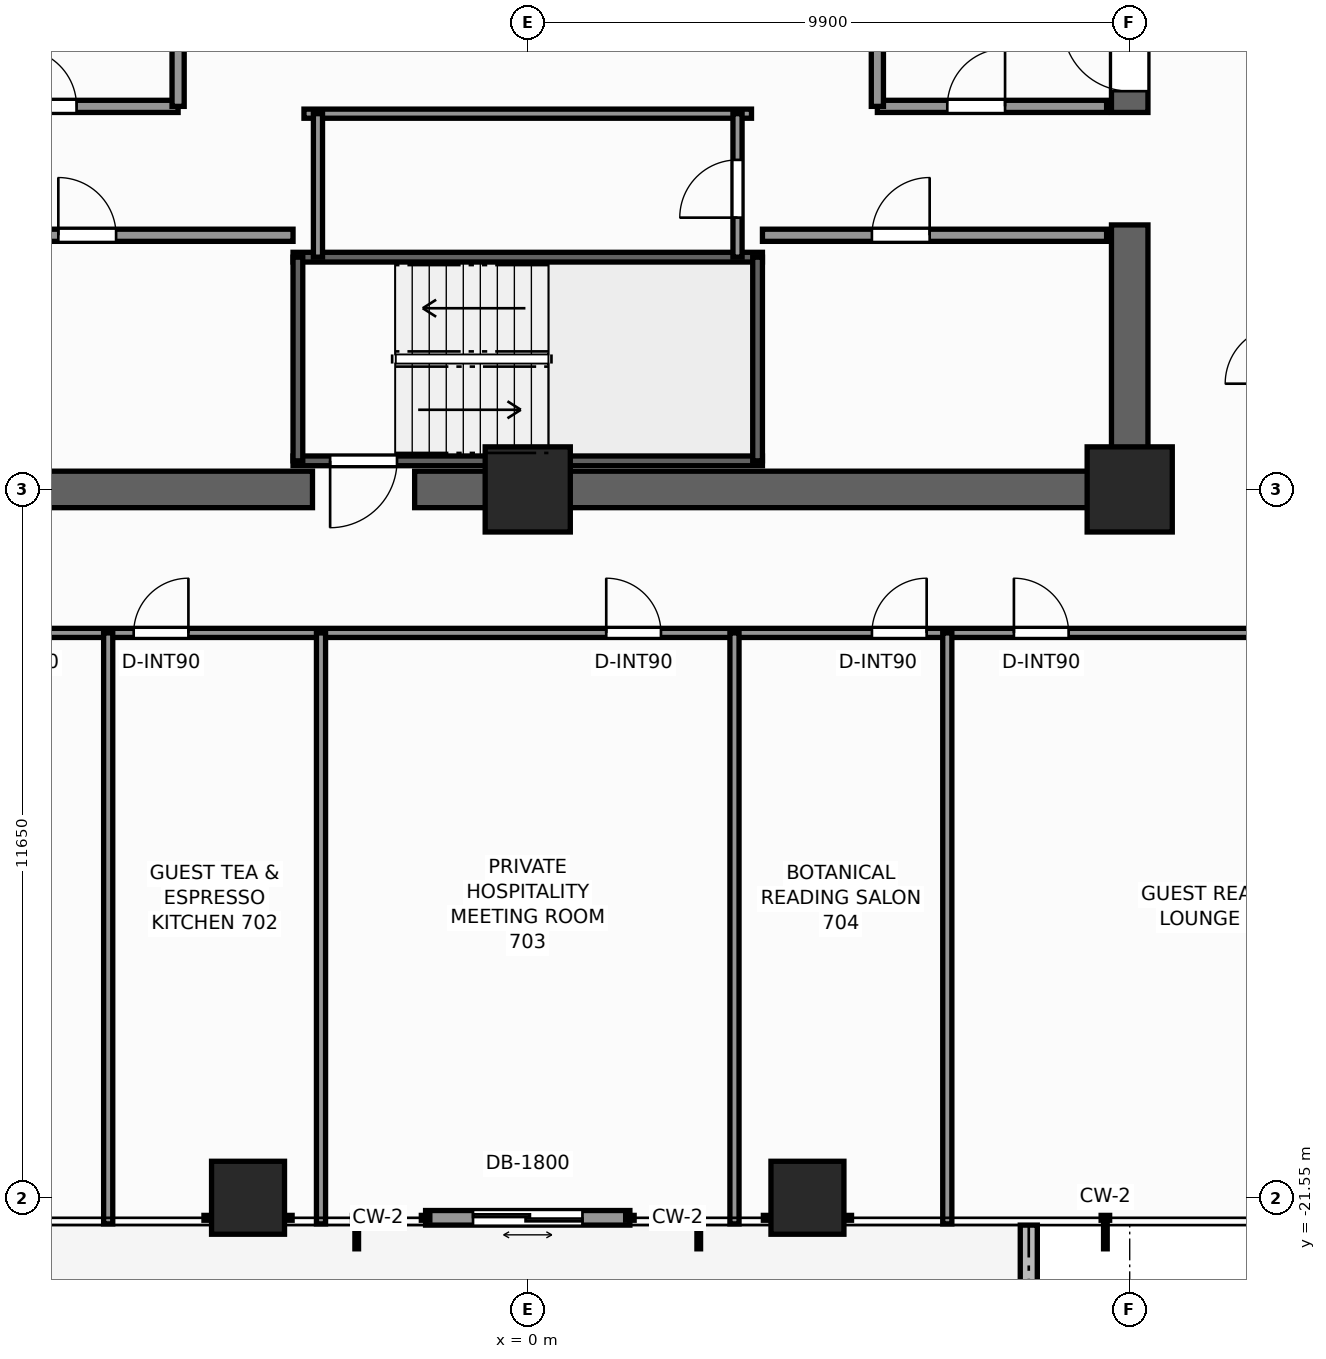
"""IFC4 building model, lengths in metres.
Left out: names, types, materials, properties, quantities, classifications, styles, units other than length and angle.
Written with IfcOpenShell. Run it as: python <this file> out.ifc"""

import sys

from ifc_helpers import new_model, si_unit, direction, frame, frame_2d, origin, origin_2d, place, context, subcontext, project, spatial, rectangle, extrude, element, fill, save


model = new_model("IFC4")
c1 = context("Model", 3, precision=1e-05, world=origin(), true_north=direction((0.0, 1.0)))
c2 = subcontext(c1, "Body", "Model", "MODEL_VIEW")
j1 = project(units=[si_unit("LENGTHUNIT", "METRE"), si_unit("PLANEANGLEUNIT", "RADIAN")], contexts=[c1])
p1 = place(None, origin())
s1 = spatial("IfcSite", under=j1, at=p1, CompositionType="ELEMENT")
p2 = place(p1, origin())
s2 = spatial("IfcBuilding", under=s1, at=p2, CompositionType="ELEMENT")
p3 = place(p2, frame((0.0, 0.0, 27.1)))
s3 = spatial("IfcBuildingStorey", under=s2, at=p3, CompositionType="ELEMENT", Elevation=27.1)
p4 = place(p3, frame((10.2, -9.9, 0.0), z_axis=(0.0, 0.0, 1.0), x_axis=(-1.0, 0.0, 0.0)))
e1 = element("IfcWall", 1, at=p4, inside=s3, PredefinedType="SHEAR", context=c2, shape_type="SweptSolid", body=[
    extrude(rectangle(XDim=12.06, YDim=0.6, at=frame_2d((6.03, 0.0))), origin(), (0.0, 0.0, 1.0), 3.3),
])
p5 = place(p3, frame((-3.54, -9.9, 0.0), z_axis=(0.0, 0.0, 1.0), x_axis=(-1.0, 0.0, 0.0)))
e2 = element("IfcWall", 2, at=p5, inside=s3, PredefinedType="SHEAR", context=c2, shape_type="SweptSolid", body=[
    extrude(rectangle(XDim=6.66, YDim=0.6, at=frame_2d((3.33, 0.0))), origin(), (0.0, 0.0, 1.0), 3.3),
])
p6 = place(p3, frame((9.9, -9.6, 0.0), z_axis=(0.0, 0.0, 1.0), x_axis=(0.0, 1.0, 0.0)))
e3 = element("IfcWall", 3, at=p6, inside=s3, PredefinedType="SHEAR", context=c2, shape_type="SweptSolid", body=[
    extrude(rectangle(XDim=4.05, YDim=0.6, at=frame_2d((2.025, 0.0))), origin(), (0.0, 0.0, 1.0), 3.3),
])
p7 = place(p3, frame((9.9, -3.7, 0.0), z_axis=(0.0, 0.0, 1.0), x_axis=(0.0, 1.0, 0.0)))
e4 = element("IfcWall", 4, at=p7, inside=s3, PredefinedType="SHEAR", context=c2, shape_type="SweptSolid", body=[
    extrude(rectangle(XDim=13.3, YDim=0.6, at=frame_2d((6.65, 0.0))), origin(), (0.0, 0.0, 1.0), 3.3),
])
p8 = place(p7, frame((0.35, 0.0, 0.0)))
e5 = element("IfcOpeningElement", 5, at=p8, cuts=e4, PredefinedType="OPENING", context=c2, shape_type="SweptSolid", body=[
    extrude(rectangle(XDim=1.1, YDim=2.2, at=frame_2d((0.55, 1.1))), frame((0.0, 0.31, 0.0), z_axis=(0.0, -1.0, 0.0), x_axis=(1.0, 0.0, 0.0)), (0.0, 0.0, 1.0), 0.62),
])
for number, where, z_axis, x_axis in (
    (6, (9.9, -9.9, 0.0), (0.0, 0.0, 1.0), (1.0, 0.0, 0.0)),
    (7, (0.0, -9.9, 0.0), (0.0, 0.0, 1.0), (1.0, 0.0, 0.0)),
):
    element("IfcColumn", number, at=place(p3, frame(where, z_axis=z_axis, x_axis=x_axis)), inside=s3, PredefinedType="COLUMN", context=c2, shape_type="SweptSolid", body=[
        extrude(rectangle(XDim=1.4, YDim=1.4, at=origin_2d()), origin(), (0.0, 0.0, 1.0), 3.3),
    ])
for number, where, z_axis, x_axis in (
    (8, (-4.6, -21.55, 0.0), (0.0, 0.0, 1.0), (1.0, 0.0, 0.0)),
    (9, (4.6, -21.55, 0.0), (0.0, 0.0, 1.0), (1.0, 0.0, 0.0)),
):
    element("IfcColumn", number, at=place(p3, frame(where, z_axis=z_axis, x_axis=x_axis)), inside=s3, PredefinedType="COLUMN", context=c2, shape_type="SweptSolid", body=[
        extrude(rectangle(XDim=1.2, YDim=1.2, at=origin_2d()), origin(), (0.0, 0.0, 1.0), 3.3),
    ])
p9 = place(p3, frame((8.24, -25.42, -0.06), z_axis=(0.0, 0.0, 1.0), x_axis=(0.0, 1.0, 0.0)))
e10 = element("IfcWall", 10, at=p9, inside=s3, PredefinedType="PARAPET", context=c2, shape_type="SweptSolid", body=[
    extrude(rectangle(XDim=3.42, YDim=0.28, at=frame_2d((1.71, 0.0))), origin(), (0.0, 0.0, 1.0), 0.42),
])
p10 = place(p3, frame((1.68, -21.88, 0.0), z_axis=(0.0, 0.0, 1.0), x_axis=(-1.0, 0.0, 0.0)))
e11 = element("IfcWall", 11, at=p10, inside=s3, PredefinedType="STANDARD", context=c2, shape_type="SweptSolid", body=[
    extrude(rectangle(XDim=3.36, YDim=0.24, at=frame_2d((1.68, 0.0))), origin(), (0.0, 0.0, 1.0), 3.06),
])
p11 = place(p10, frame((0.78, 0.0, 0.0)))
e12 = element("IfcOpeningElement", 12, at=p11, cuts=e11, PredefinedType="OPENING", context=c2, shape_type="SweptSolid", body=[
    extrude(rectangle(XDim=1.8, YDim=2.2, at=frame_2d((0.9, 1.1))), frame((0.0, 0.13, 0.0), z_axis=(0.0, -1.0, 0.0), x_axis=(1.0, 0.0, 0.0)), (0.0, 0.0, 1.0), 0.26),
])
p12 = place(p3, frame((3.86, -9.43, 0.0), z_axis=(0.0, 0.0, 1.0), x_axis=(-1.0, 0.0, 0.0)))
e13 = element("IfcWall", 13, at=p12, inside=s3, PredefinedType="SHEAR", context=c2, shape_type="SweptSolid", body=[
    extrude(rectangle(XDim=7.72, YDim=0.16, at=frame_2d((3.86, 0.0))), origin(), (0.0, 0.0, 1.0), 3.3),
])
p13 = place(p12, frame((6.01, 0.0, 0.0)))
e14 = element("IfcOpeningElement", 14, at=p13, cuts=e13, PredefinedType="OPENING", context=c2, shape_type="SweptSolid", body=[
    extrude(rectangle(XDim=1.1, YDim=2.2, at=frame_2d((0.55, 1.1))), frame((0.0, 0.09, 0.0), z_axis=(0.0, -1.0, 0.0), x_axis=(1.0, 0.0, 0.0)), (0.0, 0.0, 1.0), 0.18),
])
p14 = place(p3, frame((-3.86, -6.08, 0.0), z_axis=(0.0, 0.0, 1.0), x_axis=(1.0, 0.0, 0.0)))
e15 = element("IfcWall", 15, at=p14, inside=s3, PredefinedType="SHEAR", context=c2, shape_type="SweptSolid", body=[
    extrude(rectangle(XDim=7.72, YDim=0.16, at=frame_2d((3.86, 0.0))), origin(), (0.0, 0.0, 1.0), 3.3),
])
for number, where, z_axis, x_axis in (
    (16, (-3.78, -9.43, 0.0), (0.0, 0.0, 1.0), (0.0, 1.0, 0.0)),
    (17, (3.78, -9.43, 0.0), (0.0, 0.0, 1.0), (0.0, 1.0, 0.0)),
):
    element("IfcWall", number, at=place(p3, frame(where, z_axis=z_axis, x_axis=x_axis)), inside=s3, PredefinedType="SHEAR", context=c2, shape_type="SweptSolid", body=[
        extrude(rectangle(XDim=3.35, YDim=0.16, at=frame_2d((1.675, 0.0))), origin(), (0.0, 0.0, 1.0), 3.3),
    ])
p15 = place(p3, frame((-9.52, -3.6, 0.0), z_axis=(0.0, 0.0, 1.0), x_axis=(1.0, 0.0, 0.0)))
e18 = element("IfcWall", 18, at=p15, inside=s3, PredefinedType="SOLIDWALL", context=c2, shape_type="SweptSolid", body=[
    extrude(rectangle(XDim=3.77, YDim=0.2, at=frame_2d((1.885, 0.0))), origin(), (0.0, 0.0, 1.0), 3.06),
])
p16 = place(p15, frame((1.15, 0.0, 0.0)))
e19 = element("IfcOpeningElement", 19, at=p16, cuts=e18, PredefinedType="OPENING", context=c2, shape_type="SweptSolid", body=[
    extrude(rectangle(XDim=0.95, YDim=2.06, at=frame_2d((0.475, 1.03))), frame((0.0, 0.11, 0.0), z_axis=(0.0, -1.0, 0.0), x_axis=(1.0, 0.0, 0.0)), (0.0, 0.0, 1.0), 0.22),
])
p17 = place(p3, frame((-5.75, -3.6, 0.0), z_axis=(0.0, 0.0, 1.0), x_axis=(0.0, 1.0, 0.0)))
e20 = element("IfcWall", 20, at=p17, inside=s3, PredefinedType="SOLIDWALL", context=c2, shape_type="SweptSolid", body=[
    extrude(rectangle(XDim=5.57, YDim=0.2, at=frame_2d((2.785, 0.0))), origin(), (0.0, 0.0, 1.0), 3.06),
])
p18 = place(p17, frame((2.75, 0.0, 0.0)))
e21 = element("IfcOpeningElement", 21, at=p18, cuts=e20, PredefinedType="OPENING", context=c2, shape_type="SweptSolid", body=[
    extrude(rectangle(XDim=1.1, YDim=2.2, at=frame_2d((0.55, 1.1))), frame((0.0, 0.11, 0.0), z_axis=(0.0, -1.0, 0.0), x_axis=(1.0, 0.0, 0.0)), (0.0, 0.0, 1.0), 0.22),
])
p19 = place(p3, frame((5.75, -3.6, 0.0), z_axis=(0.0, 0.0, 1.0), x_axis=(1.0, 0.0, 0.0)))
e22 = element("IfcWall", 22, at=p19, inside=s3, PredefinedType="SOLIDWALL", context=c2, shape_type="SweptSolid", body=[
    extrude(rectangle(XDim=3.77, YDim=0.2, at=frame_2d((1.885, 0.0))), origin(), (0.0, 0.0, 1.0), 3.06),
])
p20 = place(p19, frame((1.15, 0.0, 0.0)))
e23 = element("IfcOpeningElement", 23, at=p20, cuts=e22, PredefinedType="OPENING", context=c2, shape_type="SweptSolid", body=[
    extrude(rectangle(XDim=0.95, YDim=2.06, at=frame_2d((0.475, 1.03))), frame((0.0, 0.11, 0.0), z_axis=(0.0, -1.0, 0.0), x_axis=(1.0, 0.0, 0.0)), (0.0, 0.0, 1.0), 0.22),
])
p21 = place(p3, frame((5.75, -3.6, 0.0), z_axis=(0.0, 0.0, 1.0), x_axis=(0.0, 1.0, 0.0)))
e24 = element("IfcWall", 24, at=p21, inside=s3, PredefinedType="SOLIDWALL", context=c2, shape_type="SweptSolid", body=[
    extrude(rectangle(XDim=5.57, YDim=0.2, at=frame_2d((2.785, 0.0))), origin(), (0.0, 0.0, 1.0), 3.06),
])
p22 = place(p21, frame((2.75, 0.0, 0.0)))
e25 = element("IfcOpeningElement", 25, at=p22, cuts=e24, PredefinedType="OPENING", context=c2, shape_type="SweptSolid", body=[
    extrude(rectangle(XDim=1.1, YDim=2.2, at=frame_2d((0.55, 1.1))), frame((0.0, 0.11, 0.0), z_axis=(0.0, -1.0, 0.0), x_axis=(1.0, 0.0, 0.0)), (0.0, 0.0, 1.0), 0.22),
])
p23 = place(p3, frame((-9.52, -5.72, 0.0), z_axis=(0.0, 0.0, 1.0), x_axis=(1.0, 0.0, 0.0)))
e26 = element("IfcWall", 26, at=p23, inside=s3, PredefinedType="SOLIDWALL", context=c2, shape_type="SweptSolid", body=[
    extrude(rectangle(XDim=5.66, YDim=0.2, at=frame_2d((2.83, 0.0))), origin(), (0.0, 0.0, 1.0), 3.06),
])
p24 = place(p23, frame((1.8, 0.0, 0.0)))
e27 = element("IfcOpeningElement", 27, at=p24, cuts=e26, PredefinedType="OPENING", context=c2, shape_type="SweptSolid", body=[
    extrude(rectangle(XDim=0.95, YDim=2.06, at=frame_2d((0.475, 1.03))), frame((0.0, 0.11, 0.0), z_axis=(0.0, -1.0, 0.0), x_axis=(1.0, 0.0, 0.0)), (0.0, 0.0, 1.0), 0.22),
])
p25 = place(p3, frame((3.86, -5.72, 0.0), z_axis=(0.0, 0.0, 1.0), x_axis=(1.0, 0.0, 0.0)))
e28 = element("IfcWall", 28, at=p25, inside=s3, PredefinedType="SOLIDWALL", context=c2, shape_type="SweptSolid", body=[
    extrude(rectangle(XDim=5.66, YDim=0.2, at=frame_2d((2.83, 0.0))), origin(), (0.0, 0.0, 1.0), 3.06),
])
p26 = place(p25, frame((1.8, 0.0, 0.0)))
e29 = element("IfcOpeningElement", 29, at=p26, cuts=e28, PredefinedType="OPENING", context=c2, shape_type="SweptSolid", body=[
    extrude(rectangle(XDim=0.95, YDim=2.06, at=frame_2d((0.475, 1.03))), frame((0.0, 0.11, 0.0), z_axis=(0.0, -1.0, 0.0), x_axis=(1.0, 0.0, 0.0)), (0.0, 0.0, 1.0), 0.22),
])
p27 = place(p3, frame((-3.68, -3.72, 0.0), z_axis=(0.0, 0.0, 1.0), x_axis=(1.0, 0.0, 0.0)))
e30 = element("IfcWall", 30, at=p27, inside=s3, PredefinedType="PARTITIONING", context=c2, shape_type="SweptSolid", body=[
    extrude(rectangle(XDim=7.36, YDim=0.15, at=frame_2d((3.68, 0.0))), origin(), (0.0, 0.0, 1.0), 3.06),
])
p28 = place(p3, frame((3.45, -6.08, 0.0), z_axis=(0.0, 0.0, 1.0), x_axis=(0.0, 1.0, 0.0)))
e31 = element("IfcWall", 31, at=p28, inside=s3, PredefinedType="PARTITIONING", context=c2, shape_type="SweptSolid", body=[
    extrude(rectangle(XDim=2.36, YDim=0.15, at=frame_2d((1.18, 0.0))), origin(), (0.0, 0.0, 1.0), 3.06),
])
p29 = place(p28, frame((0.65, 0.0, 0.0)))
e32 = element("IfcOpeningElement", 32, at=p29, cuts=e31, PredefinedType="OPENING", context=c2, shape_type="SweptSolid", body=[
    extrude(rectangle(XDim=0.95, YDim=2.06, at=frame_2d((0.475, 1.03))), frame((0.0, 0.085, 0.0), z_axis=(0.0, -1.0, 0.0), x_axis=(1.0, 0.0, 0.0)), (0.0, 0.0, 1.0), 0.17),
])
p30 = place(p3, frame((-3.45, -6.08, 0.0), z_axis=(0.0, 0.0, 1.0), x_axis=(0.0, 1.0, 0.0)))
e33 = element("IfcWall", 33, at=p30, inside=s3, PredefinedType="PARTITIONING", context=c2, shape_type="SweptSolid", body=[
    extrude(rectangle(XDim=2.36, YDim=0.15, at=frame_2d((1.18, 0.0))), origin(), (0.0, 0.0, 1.0), 3.06),
])
p31 = place(p3, frame((-12.26, -12.26, 0.0), z_axis=(0.0, 0.0, 1.0), x_axis=(1.0, 0.0, 0.0)))
e34 = element("IfcWall", 34, at=p31, inside=s3, PredefinedType="PARTITIONING", context=c2, shape_type="SweptSolid", body=[
    extrude(rectangle(XDim=24.68, YDim=0.15, at=frame_2d((12.34, 0.0))), origin(), (0.0, 0.0, 1.0), 2.272),
])
p32 = place(p31, frame((3.444, 0.0, 0.0)))
e35 = element("IfcOpeningElement", 35, at=p32, cuts=e34, PredefinedType="OPENING", context=c2, shape_type="SweptSolid", body=[
    extrude(rectangle(XDim=0.9, YDim=2.06, at=frame_2d((0.45, 1.03))), frame((0.0, 0.085, 0.0), z_axis=(0.0, -1.0, 0.0), x_axis=(1.0, 0.0, 0.0)), (0.0, 0.0, 1.0), 0.17),
])
p33 = place(p31, frame((5.779, 0.0, 0.0)))
e36 = element("IfcOpeningElement", 36, at=p33, cuts=e34, PredefinedType="OPENING", context=c2, shape_type="SweptSolid", body=[
    extrude(rectangle(XDim=0.9, YDim=2.06, at=frame_2d((0.45, 1.03))), frame((0.0, 0.085, 0.0), z_axis=(0.0, -1.0, 0.0), x_axis=(1.0, 0.0, 0.0)), (0.0, 0.0, 1.0), 0.17),
])
p34 = place(p31, frame((13.551, 0.0, 0.0)))
e37 = element("IfcOpeningElement", 37, at=p34, cuts=e34, PredefinedType="OPENING", context=c2, shape_type="SweptSolid", body=[
    extrude(rectangle(XDim=0.9, YDim=2.06, at=frame_2d((0.45, 1.03))), frame((0.0, 0.085, 0.0), z_axis=(0.0, -1.0, 0.0), x_axis=(1.0, 0.0, 0.0)), (0.0, 0.0, 1.0), 0.17),
])
p35 = place(p31, frame((17.921, 0.0, 0.0)))
e38 = element("IfcOpeningElement", 38, at=p35, cuts=e34, PredefinedType="OPENING", context=c2, shape_type="SweptSolid", body=[
    extrude(rectangle(XDim=0.9, YDim=2.06, at=frame_2d((0.45, 1.03))), frame((0.0, 0.085, 0.0), z_axis=(0.0, -1.0, 0.0), x_axis=(1.0, 0.0, 0.0)), (0.0, 0.0, 1.0), 0.17),
])
p36 = place(p31, frame((20.256, 0.0, 0.0)))
e39 = element("IfcOpeningElement", 39, at=p36, cuts=e34, PredefinedType="OPENING", context=c2, shape_type="SweptSolid", body=[
    extrude(rectangle(XDim=0.9, YDim=2.06, at=frame_2d((0.45, 1.03))), frame((0.0, 0.085, 0.0), z_axis=(0.0, -1.0, 0.0), x_axis=(1.0, 0.0, 0.0)), (0.0, 0.0, 1.0), 0.17),
])
for number, where, z_axis, x_axis in (
    (40, (-6.9, -21.98, 0.0), (0.0, 0.0, 1.0), (0.0, 1.0, 0.0)),
    (41, (-3.4, -21.98, 0.0), (0.0, 0.0, 1.0), (0.0, 1.0, 0.0)),
    (42, (3.4, -21.98, 0.0), (0.0, 0.0, 1.0), (0.0, 1.0, 0.0)),
    (43, (6.9, -21.98, 0.0), (0.0, 0.0, 1.0), (0.0, 1.0, 0.0)),
):
    element("IfcWall", number, at=place(p3, frame(where, z_axis=z_axis, x_axis=x_axis)), inside=s3, PredefinedType="PARTITIONING", context=c2, shape_type="SweptSolid", body=[
        extrude(rectangle(XDim=9.72, YDim=0.15, at=frame_2d((4.86, 0.0))), origin(), (0.0, 0.0, 1.0), 2.429),
    ])
p37 = place(p11, origin())
e44 = element("IfcDoor", 44, at=p37, inside=s3, OperationType="DOUBLE_DOOR_SLIDING", PredefinedType="DOOR", context=c2, shape_type="SweptSolid", body=[
    extrude(rectangle(XDim=1.8, YDim=2.2, at=frame_2d((0.9, 1.1))), frame((0.0, 0.025, 0.0), z_axis=(0.0, -1.0, 0.0), x_axis=(1.0, 0.0, 0.0)), (0.0, 0.0, 1.0), 0.05),
])
fill(e12, e44)
p38 = place(p13, origin())
e45 = element("IfcDoor", 45, at=p38, inside=s3, OperationType="SINGLE_SWING_RIGHT", PredefinedType="DOOR", context=c2, shape_type="SweptSolid", body=[
    extrude(rectangle(XDim=1.1, YDim=2.2, at=frame_2d((0.55, 1.1))), frame((0.0, 0.025, 0.0), z_axis=(0.0, -1.0, 0.0), x_axis=(1.0, 0.0, 0.0)), (0.0, 0.0, 1.0), 0.05),
])
fill(e14, e45)
p39 = place(p8, origin())
e46 = element("IfcDoor", 46, at=p39, inside=s3, OperationType="SINGLE_SWING_RIGHT", PredefinedType="DOOR", context=c2, shape_type="SweptSolid", body=[
    extrude(rectangle(XDim=1.1, YDim=2.2, at=frame_2d((0.55, 1.1))), frame((0.0, 0.025, 0.0), z_axis=(0.0, -1.0, 0.0), x_axis=(1.0, 0.0, 0.0)), (0.0, 0.0, 1.0), 0.05),
])
fill(e5, e46)
p40 = place(p24, origin())
e47 = element("IfcDoor", 47, at=p40, inside=s3, OperationType="SINGLE_SWING_LEFT", PredefinedType="DOOR", context=c2, shape_type="SweptSolid", body=[
    extrude(rectangle(XDim=0.95, YDim=2.06, at=frame_2d((0.475, 1.03))), frame((0.0, 0.025, 0.0), z_axis=(0.0, -1.0, 0.0), x_axis=(1.0, 0.0, 0.0)), (0.0, 0.0, 1.0), 0.05),
])
fill(e27, e47)
p41 = place(p16, origin())
e48 = element("IfcDoor", 48, at=p41, inside=s3, OperationType="SINGLE_SWING_LEFT", PredefinedType="DOOR", context=c2, shape_type="SweptSolid", body=[
    extrude(rectangle(XDim=0.95, YDim=2.06, at=frame_2d((0.475, 1.03))), frame((0.0, 0.025, 0.0), z_axis=(0.0, -1.0, 0.0), x_axis=(1.0, 0.0, 0.0)), (0.0, 0.0, 1.0), 0.05),
])
fill(e19, e48)
p42 = place(p26, origin())
e49 = element("IfcDoor", 49, at=p42, inside=s3, OperationType="SINGLE_SWING_RIGHT", PredefinedType="DOOR", context=c2, shape_type="SweptSolid", body=[
    extrude(rectangle(XDim=0.95, YDim=2.06, at=frame_2d((0.475, 1.03))), frame((0.0, 0.025, 0.0), z_axis=(0.0, -1.0, 0.0), x_axis=(1.0, 0.0, 0.0)), (0.0, 0.0, 1.0), 0.05),
])
fill(e29, e49)
p43 = place(p20, origin())
e50 = element("IfcDoor", 50, at=p43, inside=s3, OperationType="SINGLE_SWING_RIGHT", PredefinedType="DOOR", context=c2, shape_type="SweptSolid", body=[
    extrude(rectangle(XDim=0.95, YDim=2.06, at=frame_2d((0.475, 1.03))), frame((0.0, 0.025, 0.0), z_axis=(0.0, -1.0, 0.0), x_axis=(1.0, 0.0, 0.0)), (0.0, 0.0, 1.0), 0.05),
])
fill(e23, e50)
p44 = place(p29, origin())
e51 = element("IfcDoor", 51, at=p44, inside=s3, OperationType="SINGLE_SWING_LEFT", PredefinedType="DOOR", context=c2, shape_type="SweptSolid", body=[
    extrude(rectangle(XDim=0.95, YDim=2.06, at=frame_2d((0.475, 1.03))), frame((0.0, 0.025, 0.0), z_axis=(0.0, -1.0, 0.0), x_axis=(1.0, 0.0, 0.0)), (0.0, 0.0, 1.0), 0.05),
])
fill(e32, e51)
p45 = place(p33, origin())
e52 = element("IfcDoor", 52, at=p45, inside=s3, OperationType="SINGLE_SWING_RIGHT", PredefinedType="DOOR", context=c2, shape_type="SweptSolid", body=[
    extrude(rectangle(XDim=0.9, YDim=2.06, at=frame_2d((0.45, 1.03))), frame((0.0, 0.025, 0.0), z_axis=(0.0, -1.0, 0.0), x_axis=(1.0, 0.0, 0.0)), (0.0, 0.0, 1.0), 0.05),
])
fill(e36, e52)
p46 = place(p34, origin())
e53 = element("IfcDoor", 53, at=p46, inside=s3, OperationType="SINGLE_SWING_LEFT", PredefinedType="DOOR", context=c2, shape_type="SweptSolid", body=[
    extrude(rectangle(XDim=0.9, YDim=2.06, at=frame_2d((0.45, 1.03))), frame((0.0, 0.025, 0.0), z_axis=(0.0, -1.0, 0.0), x_axis=(1.0, 0.0, 0.0)), (0.0, 0.0, 1.0), 0.05),
])
fill(e37, e53)
p47 = place(p35, origin())
e54 = element("IfcDoor", 54, at=p47, inside=s3, OperationType="SINGLE_SWING_RIGHT", PredefinedType="DOOR", context=c2, shape_type="SweptSolid", body=[
    extrude(rectangle(XDim=0.9, YDim=2.06, at=frame_2d((0.45, 1.03))), frame((0.0, 0.025, 0.0), z_axis=(0.0, -1.0, 0.0), x_axis=(1.0, 0.0, 0.0)), (0.0, 0.0, 1.0), 0.05),
])
fill(e38, e54)
p48 = place(p36, origin())
e55 = element("IfcDoor", 55, at=p48, inside=s3, OperationType="SINGLE_SWING_LEFT", PredefinedType="DOOR", context=c2, shape_type="SweptSolid", body=[
    extrude(rectangle(XDim=0.9, YDim=2.06, at=frame_2d((0.45, 1.03))), frame((0.0, 0.025, 0.0), z_axis=(0.0, -1.0, 0.0), x_axis=(1.0, 0.0, 0.0)), (0.0, 0.0, 1.0), 0.05),
])
fill(e39, e55)
save(model, sys.argv[1])
